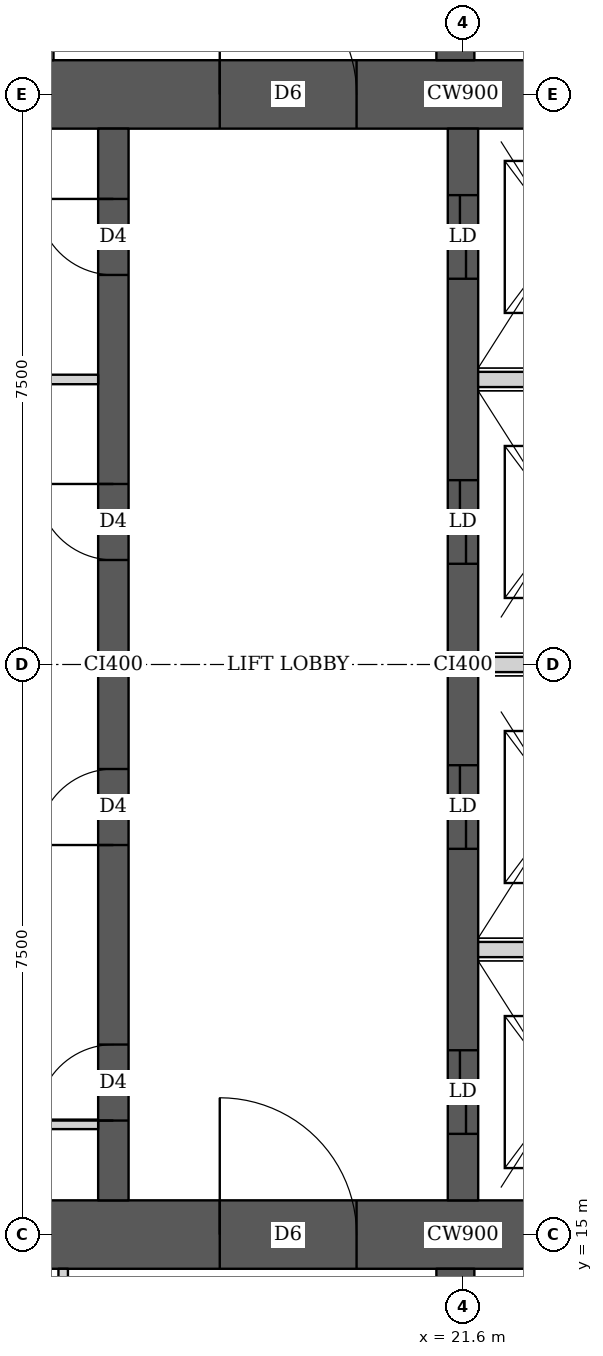
"""IFC4 building model, lengths in metres.
Left out: names, types, materials, properties, quantities, classifications, styles, units other than length and angle.
Written with IfcOpenShell. Run it as: python <this file> out.ifc"""

import sys

from ifc_helpers import new_model, si_unit, direction, frame, frame_2d, origin, place, context, subcontext, project, spatial, rectangle, extrude, element, fill, save


model = new_model("IFC4")
c1 = context("Model", 3, precision=1e-05, world=origin(), true_north=direction((0.0, 1.0)))
c2 = subcontext(c1, "Body", "Model", "MODEL_VIEW")
j1 = project(units=[si_unit("LENGTHUNIT", "METRE"), si_unit("PLANEANGLEUNIT", "RADIAN")], contexts=[c1])
p1 = place(None, origin())
s1 = spatial("IfcSite", under=j1, at=p1, CompositionType="ELEMENT")
p2 = place(p1, origin())
s2 = spatial("IfcBuilding", under=s1, at=p2, CompositionType="ELEMENT")
p3 = place(p2, frame((0.0, 0.0, 234.95)))
s3 = spatial("IfcBuildingStorey", under=s2, at=p3, CompositionType="ELEMENT", Elevation=234.95)
p4 = place(p3, frame((13.95, 15.0, 0.0), z_axis=(0.0, 0.0, 1.0), x_axis=(1.0, 0.0, 0.0)))
e1 = element("IfcWall", 1, at=p4, inside=s3, PredefinedType="SHEAR", context=c2, shape_type="SweptSolid", body=[
    extrude(rectangle(XDim=15.3, YDim=0.9, at=frame_2d((7.65, 0.0))), origin(), (0.0, 0.0, 1.0), 3.75),
])
p5 = place(p4, frame((4.45, 0.0, 0.0)))
e2 = element("IfcOpeningElement", 2, at=p5, cuts=e1, PredefinedType="OPENING", context=c2, shape_type="SweptSolid", body=[
    extrude(rectangle(XDim=1.8, YDim=2.1, at=frame_2d((0.9, 1.05))), frame((0.0, 0.46, 0.0), z_axis=(0.0, -1.0, 0.0), x_axis=(1.0, 0.0, 0.0)), (0.0, 0.0, 1.0), 0.92),
])
p6 = place(p4, frame((10.7, 0.0, 0.0)))
e3 = element("IfcOpeningElement", 3, at=p6, cuts=e1, PredefinedType="OPENING", context=c2, shape_type="SweptSolid", body=[
    extrude(rectangle(XDim=1.1, YDim=2.1, at=frame_2d((0.55, 1.05))), frame((0.0, 0.46, 0.0), z_axis=(0.0, -1.0, 0.0), x_axis=(1.0, 0.0, 0.0)), (0.0, 0.0, 1.0), 0.92),
])
p7 = place(p3, frame((13.95, 30.0, 0.0), z_axis=(0.0, 0.0, 1.0), x_axis=(1.0, 0.0, 0.0)))
e4 = element("IfcWall", 4, at=p7, inside=s3, PredefinedType="SHEAR", context=c2, shape_type="SweptSolid", body=[
    extrude(rectangle(XDim=15.3, YDim=0.9, at=frame_2d((7.65, 0.0))), origin(), (0.0, 0.0, 1.0), 3.75),
])
p8 = place(p7, frame((4.45, 0.0, 0.0)))
e5 = element("IfcOpeningElement", 5, at=p8, cuts=e4, PredefinedType="OPENING", context=c2, shape_type="SweptSolid", body=[
    extrude(rectangle(XDim=1.8, YDim=2.1, at=frame_2d((0.9, 1.05))), frame((0.0, 0.46, 0.0), z_axis=(0.0, -1.0, 0.0), x_axis=(1.0, 0.0, 0.0)), (0.0, 0.0, 1.0), 0.92),
])
p9 = place(p7, frame((10.7, 0.0, 0.0)))
e6 = element("IfcOpeningElement", 6, at=p9, cuts=e4, PredefinedType="OPENING", context=c2, shape_type="SweptSolid", body=[
    extrude(rectangle(XDim=1.1, YDim=2.1, at=frame_2d((0.55, 1.05))), frame((0.0, 0.46, 0.0), z_axis=(0.0, -1.0, 0.0), x_axis=(1.0, 0.0, 0.0)), (0.0, 0.0, 1.0), 0.92),
])
p10 = place(p3, frame((17.0, 15.45, 0.0), z_axis=(0.0, 0.0, 1.0), x_axis=(0.0, 1.0, 0.0)))
e7 = element("IfcWall", 7, at=p10, inside=s3, PredefinedType="SHEAR", context=c2, shape_type="SweptSolid", body=[
    extrude(rectangle(XDim=14.1, YDim=0.4, at=frame_2d((7.05, 0.0))), origin(), (0.0, 0.0, 1.0), 3.75),
])
p11 = place(p10, frame((1.05, 0.0, 0.0)))
e8 = element("IfcOpeningElement", 8, at=p11, cuts=e7, PredefinedType="OPENING", context=c2, shape_type="SweptSolid", body=[
    extrude(rectangle(XDim=1.0, YDim=2.1, at=frame_2d((0.5, 1.05))), frame((0.0, 0.21, 0.0), z_axis=(0.0, -1.0, 0.0), x_axis=(1.0, 0.0, 0.0)), (0.0, 0.0, 1.0), 0.42),
])
p12 = place(p10, frame((4.675, 0.0, 0.0)))
e9 = element("IfcOpeningElement", 9, at=p12, cuts=e7, PredefinedType="OPENING", context=c2, shape_type="SweptSolid", body=[
    extrude(rectangle(XDim=1.0, YDim=2.1, at=frame_2d((0.5, 1.05))), frame((0.0, 0.21, 0.0), z_axis=(0.0, -1.0, 0.0), x_axis=(1.0, 0.0, 0.0)), (0.0, 0.0, 1.0), 0.42),
])
p13 = place(p10, frame((8.425, 0.0, 0.0)))
e10 = element("IfcOpeningElement", 10, at=p13, cuts=e7, PredefinedType="OPENING", context=c2, shape_type="SweptSolid", body=[
    extrude(rectangle(XDim=1.0, YDim=2.1, at=frame_2d((0.5, 1.05))), frame((0.0, 0.21, 0.0), z_axis=(0.0, -1.0, 0.0), x_axis=(1.0, 0.0, 0.0)), (0.0, 0.0, 1.0), 0.42),
])
p14 = place(p10, frame((12.175, 0.0, 0.0)))
e11 = element("IfcOpeningElement", 11, at=p14, cuts=e7, PredefinedType="OPENING", context=c2, shape_type="SweptSolid", body=[
    extrude(rectangle(XDim=1.0, YDim=2.1, at=frame_2d((0.5, 1.05))), frame((0.0, 0.21, 0.0), z_axis=(0.0, -1.0, 0.0), x_axis=(1.0, 0.0, 0.0)), (0.0, 0.0, 1.0), 0.42),
])
p15 = place(p3, frame((21.6, 15.45, 0.0), z_axis=(0.0, 0.0, 1.0), x_axis=(0.0, 1.0, 0.0)))
e12 = element("IfcWall", 12, at=p15, inside=s3, PredefinedType="SHEAR", context=c2, shape_type="SweptSolid", body=[
    extrude(rectangle(XDim=14.1, YDim=0.4, at=frame_2d((7.05, 0.0))), origin(), (0.0, 0.0, 1.0), 3.75),
])
p16 = place(p15, frame((0.875, 0.0, 0.0)))
e13 = element("IfcOpeningElement", 13, at=p16, cuts=e12, PredefinedType="OPENING", context=c2, shape_type="SweptSolid", body=[
    extrude(rectangle(XDim=1.1, YDim=2.1, at=frame_2d((0.55, 1.05))), frame((0.0, 0.21, 0.0), z_axis=(0.0, -1.0, 0.0), x_axis=(1.0, 0.0, 0.0)), (0.0, 0.0, 1.0), 0.42),
])
p17 = place(p15, frame((4.625, 0.0, 0.0)))
e14 = element("IfcOpeningElement", 14, at=p17, cuts=e12, PredefinedType="OPENING", context=c2, shape_type="SweptSolid", body=[
    extrude(rectangle(XDim=1.1, YDim=2.1, at=frame_2d((0.55, 1.05))), frame((0.0, 0.21, 0.0), z_axis=(0.0, -1.0, 0.0), x_axis=(1.0, 0.0, 0.0)), (0.0, 0.0, 1.0), 0.42),
])
p18 = place(p15, frame((8.375, 0.0, 0.0)))
e15 = element("IfcOpeningElement", 15, at=p18, cuts=e12, PredefinedType="OPENING", context=c2, shape_type="SweptSolid", body=[
    extrude(rectangle(XDim=1.1, YDim=2.1, at=frame_2d((0.55, 1.05))), frame((0.0, 0.21, 0.0), z_axis=(0.0, -1.0, 0.0), x_axis=(1.0, 0.0, 0.0)), (0.0, 0.0, 1.0), 0.42),
])
p19 = place(p15, frame((12.125, 0.0, 0.0)))
e16 = element("IfcOpeningElement", 16, at=p19, cuts=e12, PredefinedType="OPENING", context=c2, shape_type="SweptSolid", body=[
    extrude(rectangle(XDim=1.1, YDim=2.1, at=frame_2d((0.55, 1.05))), frame((0.0, 0.21, 0.0), z_axis=(0.0, -1.0, 0.0), x_axis=(1.0, 0.0, 0.0)), (0.0, 0.0, 1.0), 0.42),
])
for number, where, z_axis, x_axis in (
    (17, (21.5, 10.35, 0.0), (0.0, 0.0, 1.0), (0.0, 1.0, 0.0)),
    (18, (21.5, 30.45, 0.0), (0.0, 0.0, 1.0), (0.0, 1.0, 0.0)),
):
    element("IfcWall", number, at=place(p3, frame(where, z_axis=z_axis, x_axis=x_axis)), inside=s3, PredefinedType="SHEAR", context=c2, shape_type="SweptSolid", body=[
        extrude(rectangle(XDim=4.2, YDim=0.5, at=frame_2d((2.1, 0.0))), origin(), (0.0, 0.0, 1.0), 3.75),
    ])
p20 = place(p3, frame((16.34, 10.762, 0.0), z_axis=(0.0, 0.0, 1.0), x_axis=(0.0, 1.0, 0.0)))
e19 = element("IfcWall", 19, at=p20, inside=s3, PredefinedType="PARTITIONING", context=c2, shape_type="SweptSolid", body=[
    extrude(rectangle(XDim=3.788, YDim=0.125, at=frame_2d((1.894, 0.0))), origin(), (0.0, 0.0, 1.0), 3.5),
])
p21 = place(p20, frame((1.338, 0.0, 0.0)))
e20 = element("IfcOpeningElement", 20, at=p21, cuts=e19, PredefinedType="OPENING", context=c2, shape_type="SweptSolid", body=[
    extrude(rectangle(XDim=1.0, YDim=2.1, at=frame_2d((0.5, 1.05))), frame((0.0, 0.073, 0.0), z_axis=(0.0, -1.0, 0.0), x_axis=(1.0, 0.0, 0.0)), (0.0, 0.0, 1.0), 0.145),
])
p22 = place(p3, frame((16.15, 30.45, 0.0), z_axis=(0.0, 0.0, 1.0), x_axis=(0.0, 1.0, 0.0)))
e21 = element("IfcWall", 21, at=p22, inside=s3, PredefinedType="PARTITIONING", context=c2, shape_type="SweptSolid", body=[
    extrude(rectangle(XDim=4.387, YDim=0.125, at=frame_2d((2.193, 0.0))), origin(), (0.0, 0.0, 1.0), 3.5),
])
p23 = place(p22, frame((1.75, 0.0, 0.0)))
e22 = element("IfcOpeningElement", 22, at=p23, cuts=e21, PredefinedType="OPENING", context=c2, shape_type="SweptSolid", body=[
    extrude(rectangle(XDim=1.0, YDim=2.1, at=frame_2d((0.5, 1.05))), frame((0.0, 0.073, 0.0), z_axis=(0.0, -1.0, 0.0), x_axis=(1.0, 0.0, 0.0)), (0.0, 0.0, 1.0), 0.145),
])
p24 = place(p3, frame((14.85, 16.45, 0.0), z_axis=(0.0, 0.0, 1.0), x_axis=(1.0, 0.0, 0.0)))
e23 = element("IfcWall", 23, at=p24, inside=s3, PredefinedType="PARTITIONING", context=c2, shape_type="SweptSolid", body=[
    extrude(rectangle(XDim=1.95, YDim=0.125, at=frame_2d((0.975, 0.0))), origin(), (0.0, 0.0, 1.0), 3.5),
])
p25 = place(p24, frame((0.2, 0.0, 0.0)))
e24 = element("IfcOpeningElement", 24, at=p25, cuts=e23, PredefinedType="OPENING", context=c2, shape_type="SweptSolid", body=[
    extrude(rectangle(XDim=1.0, YDim=2.1, at=frame_2d((0.5, 1.05))), frame((0.0, 0.073, 0.0), z_axis=(0.0, -1.0, 0.0), x_axis=(1.0, 0.0, 0.0)), (0.0, 0.0, 1.0), 0.145),
])
p26 = place(p3, frame((14.85, 26.25, 0.0), z_axis=(0.0, 0.0, 1.0), x_axis=(1.0, 0.0, 0.0)))
e25 = element("IfcWall", 25, at=p26, inside=s3, PredefinedType="PARTITIONING", context=c2, shape_type="SweptSolid", body=[
    extrude(rectangle(XDim=1.95, YDim=0.125, at=frame_2d((0.975, 0.0))), origin(), (0.0, 0.0, 1.0), 3.5),
])
for number, where, z_axis, x_axis in (
    (26, (21.8, 18.75, 0.0), (0.0, 0.0, 1.0), (1.0, 0.0, 0.0)),
    (27, (21.8, 22.5, 0.0), (0.0, 0.0, 1.0), (1.0, 0.0, 0.0)),
    (28, (21.8, 26.25, 0.0), (0.0, 0.0, 1.0), (1.0, 0.0, 0.0)),
):
    element("IfcWall", number, at=place(p3, frame(where, z_axis=z_axis, x_axis=x_axis)), inside=s3, PredefinedType="SOLIDWALL", context=c2, shape_type="SweptSolid", body=[
        extrude(rectangle(XDim=2.2, YDim=0.2, at=frame_2d((1.1, 0.0))), origin(), (0.0, 0.0, 1.0), 3.5),
    ])
p27 = place(p11, origin())
e29 = element("IfcDoor", 29, at=p27, inside=s3, OperationType="SINGLE_SWING_LEFT", PredefinedType="DOOR", context=c2, shape_type="SweptSolid", body=[
    extrude(rectangle(XDim=1.0, YDim=2.1, at=frame_2d((0.5, 1.05))), frame((0.0, 0.025, 0.0), z_axis=(0.0, -1.0, 0.0), x_axis=(1.0, 0.0, 0.0)), (0.0, 0.0, 1.0), 0.05),
])
fill(e8, e29)
p28 = place(p12, origin())
e30 = element("IfcDoor", 30, at=p28, inside=s3, OperationType="SINGLE_SWING_LEFT", PredefinedType="DOOR", context=c2, shape_type="SweptSolid", body=[
    extrude(rectangle(XDim=1.0, YDim=2.1, at=frame_2d((0.5, 1.05))), frame((0.0, 0.025, 0.0), z_axis=(0.0, -1.0, 0.0), x_axis=(1.0, 0.0, 0.0)), (0.0, 0.0, 1.0), 0.05),
])
fill(e9, e30)
p29 = place(p13, origin())
e31 = element("IfcDoor", 31, at=p29, inside=s3, OperationType="SINGLE_SWING_RIGHT", PredefinedType="DOOR", context=c2, shape_type="SweptSolid", body=[
    extrude(rectangle(XDim=1.0, YDim=2.1, at=frame_2d((0.5, 1.05))), frame((0.0, 0.025, 0.0), z_axis=(0.0, -1.0, 0.0), x_axis=(1.0, 0.0, 0.0)), (0.0, 0.0, 1.0), 0.05),
])
fill(e10, e31)
p30 = place(p14, origin())
e32 = element("IfcDoor", 32, at=p30, inside=s3, OperationType="SINGLE_SWING_RIGHT", PredefinedType="DOOR", context=c2, shape_type="SweptSolid", body=[
    extrude(rectangle(XDim=1.0, YDim=2.1, at=frame_2d((0.5, 1.05))), frame((0.0, 0.025, 0.0), z_axis=(0.0, -1.0, 0.0), x_axis=(1.0, 0.0, 0.0)), (0.0, 0.0, 1.0), 0.05),
])
fill(e11, e32)
p31 = place(p5, origin())
e33 = element("IfcDoor", 33, at=p31, inside=s3, OperationType="DOUBLE_DOOR_SINGLE_SWING", PredefinedType="DOOR", context=c2, shape_type="SweptSolid", body=[
    extrude(rectangle(XDim=1.8, YDim=2.1, at=frame_2d((0.9, 1.05))), frame((0.0, 0.025, 0.0), z_axis=(0.0, -1.0, 0.0), x_axis=(1.0, 0.0, 0.0)), (0.0, 0.0, 1.0), 0.05),
])
fill(e2, e33)
p32 = place(p8, origin())
e34 = element("IfcDoor", 34, at=p32, inside=s3, OperationType="DOUBLE_DOOR_SINGLE_SWING", PredefinedType="DOOR", context=c2, shape_type="SweptSolid", body=[
    extrude(rectangle(XDim=1.8, YDim=2.1, at=frame_2d((0.9, 1.05))), frame((0.0, 0.025, 0.0), z_axis=(0.0, -1.0, 0.0), x_axis=(1.0, 0.0, 0.0)), (0.0, 0.0, 1.0), 0.05),
])
fill(e5, e34)
p33 = place(p16, origin())
e35 = element("IfcDoor", 35, at=p33, inside=s3, OperationType="DOUBLE_DOOR_SLIDING", PredefinedType="DOOR", context=c2, shape_type="SweptSolid", body=[
    extrude(rectangle(XDim=1.1, YDim=2.1, at=frame_2d((0.55, 1.05))), frame((0.0, 0.025, 0.0), z_axis=(0.0, -1.0, 0.0), x_axis=(1.0, 0.0, 0.0)), (0.0, 0.0, 1.0), 0.05),
])
fill(e13, e35)
p34 = place(p17, origin())
e36 = element("IfcDoor", 36, at=p34, inside=s3, OperationType="DOUBLE_DOOR_SLIDING", PredefinedType="DOOR", context=c2, shape_type="SweptSolid", body=[
    extrude(rectangle(XDim=1.1, YDim=2.1, at=frame_2d((0.55, 1.05))), frame((0.0, 0.025, 0.0), z_axis=(0.0, -1.0, 0.0), x_axis=(1.0, 0.0, 0.0)), (0.0, 0.0, 1.0), 0.05),
])
fill(e14, e36)
p35 = place(p18, origin())
e37 = element("IfcDoor", 37, at=p35, inside=s3, OperationType="DOUBLE_DOOR_SLIDING", PredefinedType="DOOR", context=c2, shape_type="SweptSolid", body=[
    extrude(rectangle(XDim=1.1, YDim=2.1, at=frame_2d((0.55, 1.05))), frame((0.0, 0.025, 0.0), z_axis=(0.0, -1.0, 0.0), x_axis=(1.0, 0.0, 0.0)), (0.0, 0.0, 1.0), 0.05),
])
fill(e15, e37)
p36 = place(p19, origin())
e38 = element("IfcDoor", 38, at=p36, inside=s3, OperationType="DOUBLE_DOOR_SLIDING", PredefinedType="DOOR", context=c2, shape_type="SweptSolid", body=[
    extrude(rectangle(XDim=1.1, YDim=2.1, at=frame_2d((0.55, 1.05))), frame((0.0, 0.025, 0.0), z_axis=(0.0, -1.0, 0.0), x_axis=(1.0, 0.0, 0.0)), (0.0, 0.0, 1.0), 0.05),
])
fill(e16, e38)
save(model, sys.argv[1])
